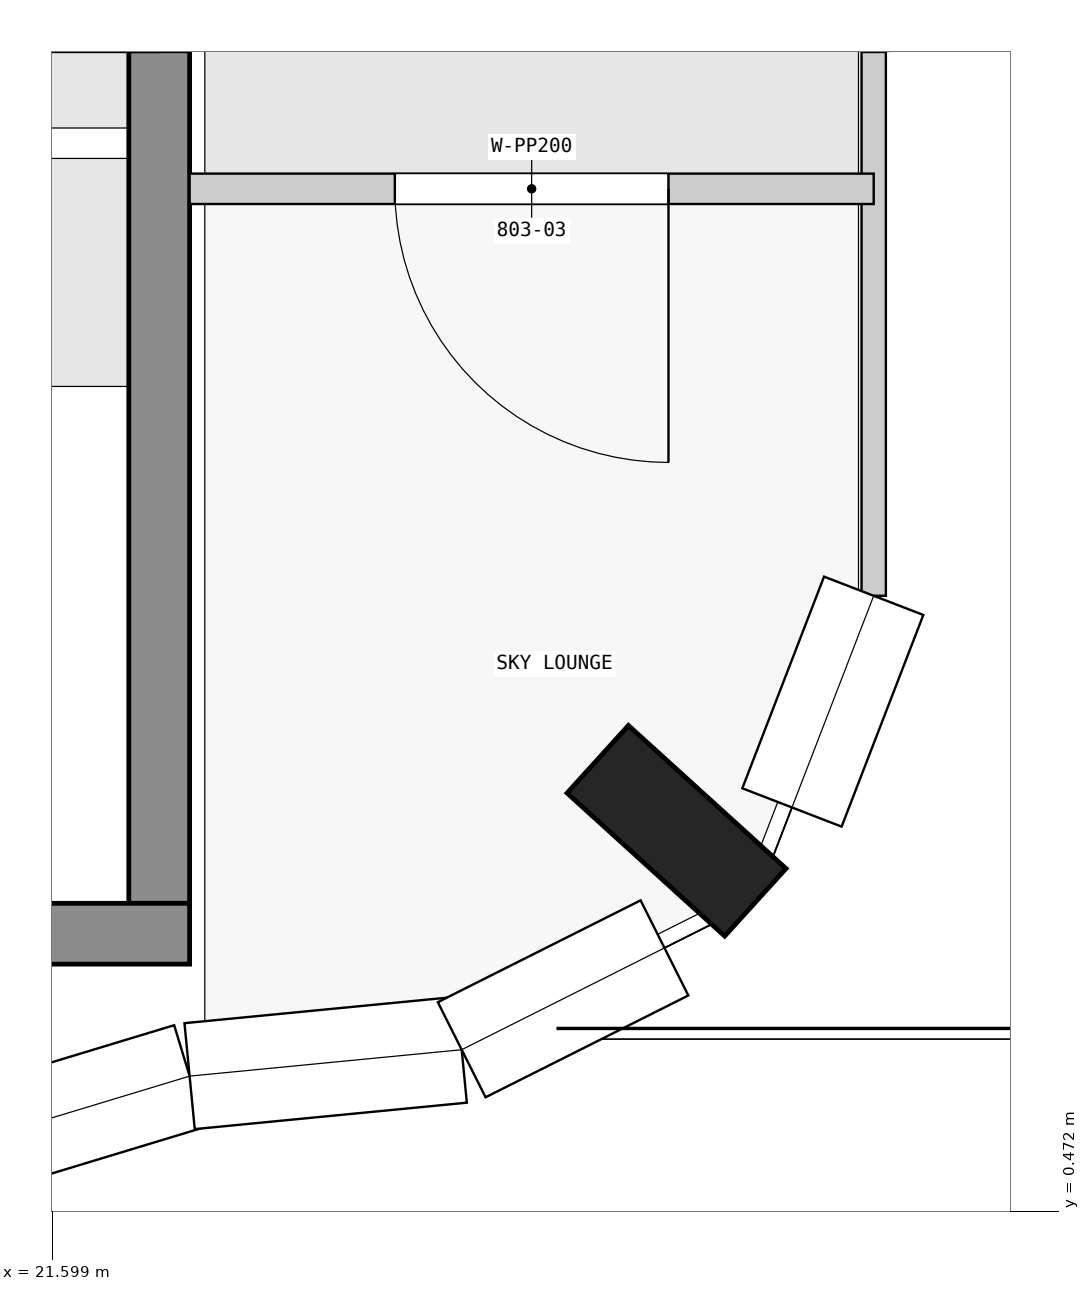
"""IFC4 building model, lengths in metres.
Left out: names, types, materials, properties, quantities, classifications, styles, units other than length and angle.
Written with IfcOpenShell. Run it as: python <this file> out.ifc"""

import sys

from ifc_helpers import new_model, si_unit, direction, frame, frame_2d, origin, origin_2d, place, context, subcontext, project, spatial, rectangle, extrude, element, fill, save


model = new_model("IFC4")
c1 = context("Model", 3, precision=1e-05, world=origin(), true_north=direction((0.0, 1.0)))
c2 = subcontext(c1, "Body", "Model", "MODEL_VIEW")
j1 = project(units=[si_unit("LENGTHUNIT", "METRE"), si_unit("PLANEANGLEUNIT", "RADIAN")], contexts=[c1])
p1 = place(None, origin())
s1 = spatial("IfcSite", under=j1, at=p1, CompositionType="ELEMENT")
p2 = place(p1, origin())
s2 = spatial("IfcBuilding", under=s1, at=p2, CompositionType="ELEMENT")
p3 = place(p2, frame((0.0, 0.0, 301.9)))
s3 = spatial("IfcBuildingStorey", under=s2, at=p3, CompositionType="ELEMENT", Elevation=301.9)
p4 = place(p3, frame((25.703, 2.977, 0.0), z_axis=(0.0, 0.0, 1.0), x_axis=(0.672084253376, 0.740474683135, 0.0)))
e1 = element("IfcColumn", 1, at=p4, inside=s3, PredefinedType="COLUMN", context=c2, shape_type="SweptSolid", body=[
    extrude(rectangle(XDim=0.6, YDim=1.4, at=origin_2d()), origin(), (0.0, 0.0, 1.0), 3.5),
])
p5 = place(p3, frame((1.9, 2.3, 0.0), z_axis=(0.0, 0.0, 1.0), x_axis=(1.0, 0.0, 0.0)))
e2 = element("IfcWall", 2, at=p5, inside=s3, PredefinedType="SHEAR", context=c2, shape_type="SweptSolid", body=[
    extrude(rectangle(XDim=20.6, YDim=0.4, at=frame_2d((10.3, 0.0))), origin(), (0.0, 0.0, 1.0), 3.25),
])
p6 = place(p3, frame((22.3, 2.5, 0.0), z_axis=(0.0, 0.0, 1.0), x_axis=(0.0, 1.0, 0.0)))
e3 = element("IfcWall", 3, at=p6, inside=s3, PredefinedType="SHEAR", context=c2, shape_type="SweptSolid", body=[
    extrude(rectangle(XDim=15.1, YDim=0.4, at=frame_2d((7.55, 0.0))), origin(), (0.0, 0.0, 1.0), 3.25),
])
p7 = place(p6, frame((5.6, 0.0, 0.0)))
e4 = element("IfcOpeningElement", 4, at=p7, cuts=e3, PredefinedType="OPENING", context=c2, shape_type="SweptSolid", body=[
    extrude(rectangle(XDim=1.8, YDim=2.1, at=frame_2d((0.9, 1.05))), frame((0.0, 0.21, 0.0), z_axis=(0.0, -1.0, 0.0), x_axis=(1.0, 0.0, 0.0)), (0.0, 0.0, 1.0), 0.42),
])
p8 = place(p3, frame((27.0, 13.477, 0.0), z_axis=(0.0, 0.0, 1.0), x_axis=(0.0, -1.0, 0.0)))
e5 = element("IfcWall", 5, at=p8, inside=s3, PredefinedType="STANDARD", context=c2, shape_type="SweptSolid", body=[
    extrude(rectangle(XDim=8.954, YDim=0.16, at=frame_2d((4.477, 0.0))), origin(), (0.0, 0.0, 1.0), 3.25),
])
p9 = place(p8, frame((3.577, 0.0, 0.0)))
e6 = element("IfcOpeningElement", 6, at=p9, cuts=e5, PredefinedType="OPENING", context=c2, shape_type="SweptSolid", body=[
    extrude(rectangle(XDim=1.8, YDim=2.4, at=frame_2d((0.9, 1.2))), frame((0.0, 0.09, 0.0), z_axis=(0.0, -1.0, 0.0), x_axis=(1.0, 0.0, 0.0)), (0.0, 0.0, 1.0), 0.18),
])
p10 = place(p3, frame((27.0, 7.2, 0.0), z_axis=(0.0, 0.0, 1.0), x_axis=(-1.0, 0.0, 0.0)))
e7 = element("IfcWall", 7, at=p10, inside=s3, PredefinedType="PARTITIONING", context=c2, shape_type="SweptSolid", body=[
    extrude(rectangle(XDim=4.5, YDim=0.2, at=frame_2d((2.25, 0.0))), origin(), (0.0, 0.0, 1.0), 2.642),
])
p11 = place(p10, frame((1.35, 0.0, 0.0)))
e8 = element("IfcOpeningElement", 8, at=p11, cuts=e7, PredefinedType="OPENING", context=c2, shape_type="SweptSolid", body=[
    extrude(rectangle(XDim=1.8, YDim=2.1, at=frame_2d((0.9, 1.05))), frame((0.0, 0.11, 0.0), z_axis=(0.0, -1.0, 0.0), x_axis=(1.0, 0.0, 0.0)), (0.0, 0.0, 1.0), 0.22),
])
p12 = place(p9, origin())
e9 = element("IfcDoor", 9, at=p12, inside=s3, OperationType="SINGLE_SWING_LEFT", PredefinedType="DOOR", context=c2, shape_type="SweptSolid", body=[
    extrude(rectangle(XDim=1.8, YDim=2.4, at=frame_2d((0.9, 1.2))), frame((0.0, 0.025, 0.0), z_axis=(0.0, -1.0, 0.0), x_axis=(1.0, 0.0, 0.0)), (0.0, 0.0, 1.0), 0.05),
])
fill(e6, e9)
p13 = place(p7, origin())
e10 = element("IfcDoor", 10, at=p13, inside=s3, OperationType="DOUBLE_DOOR_SINGLE_SWING", PredefinedType="DOOR", context=c2, shape_type="SweptSolid", body=[
    extrude(rectangle(XDim=1.8, YDim=2.1, at=frame_2d((0.9, 1.05))), frame((0.0, 0.025, 0.0), z_axis=(0.0, -1.0, 0.0), x_axis=(1.0, 0.0, 0.0)), (0.0, 0.0, 1.0), 0.05),
])
fill(e4, e10)
p14 = place(p11, origin())
e11 = element("IfcDoor", 11, at=p14, inside=s3, OperationType="DOUBLE_DOOR_SINGLE_SWING", PredefinedType="DOOR", context=c2, shape_type="SweptSolid", body=[
    extrude(rectangle(XDim=1.8, YDim=2.1, at=frame_2d((0.9, 1.05))), frame((0.0, 0.025, 0.0), z_axis=(0.0, -1.0, 0.0), x_axis=(1.0, 0.0, 0.0)), (0.0, 0.0, 1.0), 0.05),
])
fill(e8, e11)
save(model, sys.argv[1])
